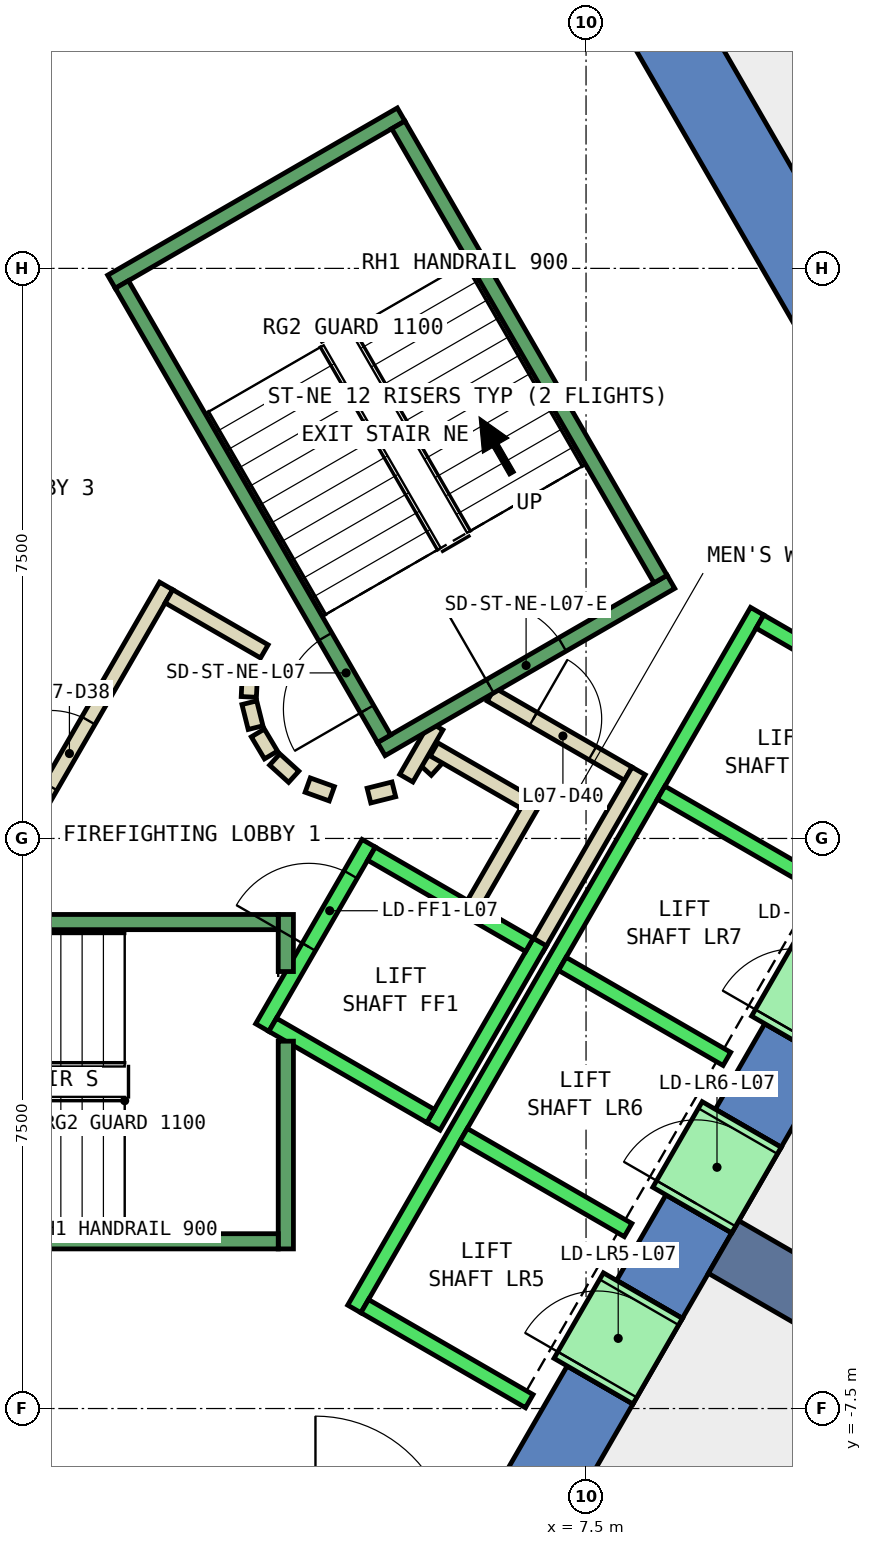
"""IFC4 building model, lengths in metres.
Left out: names, types, materials, properties, quantities, classifications, styles, units other than length and angle.
Written with IfcOpenShell. Run it as: python <this file> out.ifc"""

import sys

from ifc_helpers import new_model, si_unit, direction, frame, frame_2d, origin, place, context, subcontext, project, spatial, polyline, rectangle, outline, extrude, element, fill, save


model = new_model("IFC4")
c1 = context("Model", 3, precision=1e-05, world=origin(), true_north=direction((0.0, 1.0)))
c2 = subcontext(c1, "Body", "Model", "MODEL_VIEW")
j1 = project(units=[si_unit("LENGTHUNIT", "METRE"), si_unit("PLANEANGLEUNIT", "RADIAN")], contexts=[c1])
p1 = place(None, origin())
s1 = spatial("IfcSite", under=j1, at=p1, CompositionType="ELEMENT")
p2 = place(p1, origin())
s2 = spatial("IfcBuilding", under=s1, at=p2, CompositionType="ELEMENT")
p3 = place(p2, frame((0.0, 0.0, 39.2)))
s3 = spatial("IfcBuildingStorey", under=s2, at=p3, CompositionType="ELEMENT", Elevation=39.2)
p4 = place(p3, frame((0.0, 0.0, -0.4)))
e1 = element("IfcWall", 1, at=p4, inside=s3, PredefinedType="SHEAR", context=c2, shape_type="SweptSolid", body=[
    extrude(outline(polyline([(8.517, 11.748), (7.651, 11.248), (12.702, 2.5), (13.856, 2.5), (8.517, 11.748)])), origin(), (0.0, 0.0, 1.0), 4.2),
])
p5 = place(p3, frame((0.0, 0.0, -0.4)))
e2 = element("IfcWall", 2, at=p5, inside=s3, PredefinedType="SHEAR", context=c2, shape_type="SweptSolid", body=[
    extrude(outline(polyline([(8.117, -7.44), (7.252, -6.94), (6.351, -8.5), (6.928, -9.5), (8.117, -7.44)])), origin(), (0.0, 0.0, 1.0), 4.2),
])
p6 = place(p3, frame((0.0, 0.0, -0.4)))
e3 = element("IfcWall", 3, at=p6, inside=s3, PredefinedType="SHEAR", context=c2, shape_type="SweptSolid", body=[
    extrude(outline(polyline([(9.417, -5.189), (8.551, -4.689), (7.902, -5.814), (8.767, -6.314), (9.417, -5.189)])), origin(), (0.0, 0.0, 1.0), 4.2),
])
p7 = place(p3, frame((0.0, 0.0, -0.4)))
e4 = element("IfcWall", 4, at=p7, inside=s3, PredefinedType="SHEAR", context=c2, shape_type="SweptSolid", body=[
    extrude(outline(polyline([(10.717, -2.937), (9.851, -2.437), (9.201, -3.563), (10.067, -4.063), (10.717, -2.937)])), origin(), (0.0, 0.0, 1.0), 4.2),
])
p8 = place(p3, frame((0.0, 0.0, 3.6)))
e5 = element("IfcWall", 5, at=p8, inside=s3, PredefinedType="SHEAR", context=c2, shape_type="SweptSolid", body=[
    extrude(outline(polyline([(8.767, -6.314), (7.902, -5.814), (7.252, -6.94), (8.117, -7.44), (8.767, -6.314)])), origin(), (0.0, 0.0, 1.0), 0.2),
])
p9 = place(p3, frame((0.0, 0.0, 3.6)))
e6 = element("IfcWall", 6, at=p9, inside=s3, PredefinedType="SHEAR", context=c2, shape_type="SweptSolid", body=[
    extrude(outline(polyline([(10.067, -4.063), (9.201, -3.563), (8.551, -4.689), (9.417, -5.189), (10.067, -4.063)])), origin(), (0.0, 0.0, 1.0), 0.2),
])
p10 = place(p3, frame((0.0, 0.0, 3.6)))
e7 = element("IfcWall", 7, at=p10, inside=s3, PredefinedType="SHEAR", context=c2, shape_type="SweptSolid", body=[
    extrude(outline(polyline([(11.367, -1.811), (10.501, -1.311), (9.851, -2.437), (10.717, -2.937), (11.367, -1.811)])), origin(), (0.0, 0.0, 1.0), 0.2),
])
p11 = place(p3, frame((9.31, -5.375, -0.4), z_axis=(0.0, 0.0, 1.0), x_axis=(0.866017533419, -0.500013631625, 0.0)))
e8 = element("IfcWall", 8, at=p11, inside=s3, PredefinedType="SHEAR", context=c2, shape_type="SweptSolid", body=[
    extrude(rectangle(XDim=9.0, YDim=0.8, at=frame_2d((4.5, 0.0))), origin(), (0.0, 0.0, 1.0), 4.2),
])
p12 = place(p3, frame((5.39, 0.898, 0.0), z_axis=(0.0, 0.0, 1.0), x_axis=(0.673828488714, 0.738887791073, 0.0)))
e9 = element("IfcWall", 9, at=p12, inside=s3, PredefinedType="PARTITIONING", context=c2, shape_type="SweptSolid", body=[
    extrude(rectangle(XDim=0.263, YDim=0.2, at=frame_2d((0.131, 0.0))), origin(), (0.0, 0.0, 1.0), 3.8),
])
p13 = place(p3, frame((5.499, 1.172, 0.0), z_axis=(0.0, 0.0, 1.0), x_axis=(0.866333505267, -0.499465972466, 0.0)))
e10 = element("IfcWall", 10, at=p13, inside=s3, PredefinedType="PARTITIONING", context=c2, shape_type="SweptSolid", body=[
    extrude(rectangle(XDim=1.374, YDim=0.2, at=frame_2d((0.687, 0.0))), origin(), (0.0, 0.0, 1.0), 3.8),
])
p14 = place(p3, frame((6.826, 0.522, 0.0), z_axis=(0.0, 0.0, 1.0), x_axis=(-0.500016722714, -0.866015748706, 0.0)))
e11 = element("IfcWall", 11, at=p14, inside=s3, PredefinedType="PARTITIONING", context=c2, shape_type="SweptSolid", body=[
    extrude(rectangle(XDim=1.7, YDim=0.2, at=frame_2d((0.85, 0.0))), origin(), (0.0, 0.0, 1.0), 3.8),
])
p15 = place(p3, frame((6.25, 1.894, 0.0), z_axis=(0.0, 0.0, 1.0), x_axis=(0.866043184279, -0.499969202016, 0.0)))
e12 = element("IfcWall", 12, at=p15, inside=s3, PredefinedType="PARTITIONING", context=c2, shape_type="SweptSolid", body=[
    extrude(rectangle(XDim=2.084, YDim=0.2, at=frame_2d((1.042, 0.0))), origin(), (0.0, 0.0, 1.0), 3.8),
])
p16 = place(p15, frame((0.642, 0.0, 0.0)))
e13 = element("IfcOpeningElement", 13, at=p16, cuts=e12, PredefinedType="OPENING", context=c2, shape_type="SweptSolid", body=[
    extrude(rectangle(XDim=0.9, YDim=2.1, at=frame_2d((0.45, 1.05))), frame((0.0, 0.11, 0.0), z_axis=(0.0, -1.0, 0.0), x_axis=(1.0, 0.0, 0.0)), (0.0, 0.0, 1.0), 0.22),
])
p17 = place(p3, frame((8.192, 0.888, 0.0), z_axis=(0.0, 0.0, 1.0), x_axis=(-0.499940625693, -0.866059680843, 0.0)))
e14 = element("IfcWall", 14, at=p17, inside=s3, PredefinedType="PARTITIONING", context=c2, shape_type="SweptSolid", body=[
    extrude(rectangle(XDim=2.68, YDim=0.2, at=frame_2d((1.34, 0.0))), origin(), (0.0, 0.0, 1.0), 3.8),
])
p18 = place(p3, frame((5.135, 0.793, 0.0), z_axis=(0.0, 0.0, 1.0), x_axis=(0.499526442893, 0.866298639529, 0.0)))
e15 = element("IfcWall", 15, at=p18, inside=s3, PredefinedType="PARTITIONING", context=c2, shape_type="SweptSolid", body=[
    extrude(rectangle(XDim=0.791, YDim=0.2, at=frame_2d((0.396, 0.0))), origin(), (0.0, 0.0, 1.0), 3.8),
])
p19 = place(p3, frame((-0.52, -1.0, 0.0), z_axis=(0.0, 0.0, 1.0), x_axis=(0.50011622646, 0.865958290007, 0.0)))
e16 = element("IfcWall", 16, at=p19, inside=s3, PredefinedType="PARTITIONING", context=c2, shape_type="SweptSolid", body=[
    extrude(rectangle(XDim=4.991, YDim=0.2, at=frame_2d((2.496, 0.0))), origin(), (0.0, 0.0, 1.0), 3.8),
])
p20 = place(p19, frame((1.945, 0.0, 0.0)))
e17 = element("IfcOpeningElement", 17, at=p20, cuts=e16, PredefinedType="OPENING", context=c2, shape_type="SweptSolid", body=[
    extrude(rectangle(XDim=1.0, YDim=2.1, at=frame_2d((0.5, 1.05))), frame((0.0, 0.11, 0.0), z_axis=(0.0, -1.0, 0.0), x_axis=(1.0, 0.0, 0.0)), (0.0, 0.0, 1.0), 0.22),
])
p21 = place(p3, frame((2.012, 3.186, 0.0), z_axis=(0.0, 0.0, 1.0), x_axis=(0.865891012941, -0.500232699559, 0.0)))
e18 = element("IfcWall", 18, at=p21, inside=s3, PredefinedType="PARTITIONING", context=c2, shape_type="SweptSolid", body=[
    extrude(rectangle(XDim=1.449, YDim=0.2, at=frame_2d((0.725, 0.0))), origin(), (0.0, 0.0, 1.0), 3.8),
])
p22 = place(p3, frame((3.079, 2.199, 0.0), z_axis=(0.0, 0.0, 1.0), x_axis=(-0.047771483479, -0.998858290933, 0.0)))
e19 = element("IfcWall", 19, at=p22, inside=s3, PredefinedType="PARTITIONING", context=c2, shape_type="SweptSolid", body=[
    extrude(rectangle(XDim=0.337, YDim=0.2, at=frame_2d((0.169, 0.0))), origin(), (0.0, 0.0, 1.0), 3.8),
])
p23 = place(p3, frame((3.07, 1.786, 0.0), z_axis=(0.0, 0.0, 1.0), x_axis=(0.242705583207, -0.970099994784, 0.0)))
e20 = element("IfcWall", 20, at=p23, inside=s3, PredefinedType="PARTITIONING", context=c2, shape_type="SweptSolid", body=[
    extrude(rectangle(XDim=0.338, YDim=0.2, at=frame_2d((0.169, 0.0))), origin(), (0.0, 0.0, 1.0), 3.8),
])
for number, where, z_axis, x_axis in (
    (21, (3.182, 1.388, 0.0), (0.0, 0.0, 1.0), (0.512, -0.859, 0.0)),
    (22, (3.404, 1.039, 0.0), (0.0, 0.0, 1.0), (0.74, -0.672, 0.0)),
):
    element("IfcWall", number, at=place(p3, frame(where, z_axis=z_axis, x_axis=x_axis)), inside=s3, PredefinedType="PARTITIONING", context=c2, shape_type="SweptSolid", body=[
        extrude(rectangle(XDim=0.338, YDim=0.2, at=frame_2d((0.169, 0.0))), origin(), (0.0, 0.0, 1.0), 3.8),
    ])
p24 = place(p3, frame((3.838, 0.702, 0.0), z_axis=(0.0, 0.0, 1.0), x_axis=(0.941035081519, -0.338308993895, 0.0)))
e23 = element("IfcWall", 23, at=p24, inside=s3, PredefinedType="PARTITIONING", context=c2, shape_type="SweptSolid", body=[
    extrude(rectangle(XDim=0.337, YDim=0.2, at=frame_2d((0.168, 0.0))), origin(), (0.0, 0.0, 1.0), 3.8),
])
p25 = place(p3, frame((4.644, 0.564, 0.0), z_axis=(0.0, 0.0, 1.0), x_axis=(0.969929076366, 0.243387729394, 0.0)))
e24 = element("IfcWall", 24, at=p25, inside=s3, PredefinedType="PARTITIONING", context=c2, shape_type="SweptSolid", body=[
    extrude(rectangle(XDim=0.337, YDim=0.2, at=frame_2d((0.168, 0.0))), origin(), (0.0, 0.0, 1.0), 3.8),
])
p26 = place(p3, frame((12.401, -7.621, 0.0), z_axis=(0.0, 0.0, 1.0), x_axis=(-0.499983724212, -0.866034800411, 0.0)))
e25 = element("IfcWall", 25, at=p26, inside=s3, PredefinedType="PARTITIONING", context=c2, shape_type="SweptSolid", body=[
    extrude(rectangle(XDim=9.302, YDim=0.2, at=frame_2d((4.651, 0.0))), origin(), (0.0, 0.0, 1.0), 3.8),
])
p27 = place(p26, frame((1.429, 0.0, 0.0)))
e26 = element("IfcOpeningElement", 26, at=p27, cuts=e25, PredefinedType="OPENING", context=c2, shape_type="SweptSolid", body=[
    extrude(rectangle(XDim=1.0, YDim=2.1, at=frame_2d((0.5, 1.05))), frame((0.0, 0.11, 0.0), z_axis=(0.0, -1.0, 0.0), x_axis=(1.0, 0.0, 0.0)), (0.0, 0.0, 1.0), 0.22),
])
p28 = place(p26, frame((2.529, 0.0, 0.0)))
e27 = element("IfcOpeningElement", 27, at=p28, cuts=e25, PredefinedType="OPENING", context=c2, shape_type="SweptSolid", body=[
    extrude(rectangle(XDim=1.0, YDim=2.1, at=frame_2d((0.5, 1.05))), frame((0.0, 0.11, 0.0), z_axis=(0.0, -1.0, 0.0), x_axis=(1.0, 0.0, 0.0)), (0.0, 0.0, 1.0), 0.22),
])
p29 = place(p3, frame((3.24, -2.488, 0.0), z_axis=(0.0, 0.0, 1.0), x_axis=(0.49994636267, 0.866056369097, 0.0)))
e28 = element("IfcWall", 28, at=p29, inside=s3, PredefinedType="STANDARD", context=c2, shape_type="SweptSolid", body=[
    extrude(rectangle(XDim=2.8, YDim=0.2, at=frame_2d((1.4, 0.0))), origin(), (0.0, 0.0, 1.0), 3.8),
])
p30 = place(p29, frame((1.225, 0.0, 0.0)))
e29 = element("IfcOpeningElement", 29, at=p30, cuts=e28, PredefinedType="OPENING", context=c2, shape_type="SweptSolid", body=[
    extrude(rectangle(XDim=1.1, YDim=2.1, at=frame_2d((0.55, 1.05))), frame((0.0, 0.11, 0.0), z_axis=(0.0, -1.0, 0.0), x_axis=(1.0, 0.0, 0.0)), (0.0, 0.0, 1.0), 0.22),
])
p31 = place(p3, frame((5.492, -3.788, 0.0), z_axis=(0.0, 0.0, 1.0), x_axis=(0.500011755427, 0.866018616679, 0.0)))
e30 = element("IfcWall", 30, at=p31, inside=s3, PredefinedType="STANDARD", context=c2, shape_type="SweptSolid", body=[
    extrude(rectangle(XDim=2.8, YDim=0.2, at=frame_2d((1.4, 0.0))), origin(), (0.0, 0.0, 1.0), 3.8),
])
p32 = place(p3, frame((3.377, -2.452, 0.0), z_axis=(0.0, 0.0, 1.0), x_axis=(0.865955154139, -0.50012165622, 0.0)))
e31 = element("IfcWall", 31, at=p32, inside=s3, PredefinedType="STANDARD", context=c2, shape_type="SweptSolid", body=[
    extrude(rectangle(XDim=2.4, YDim=0.2, at=frame_2d((1.2, 0.0))), origin(), (0.0, 0.0, 1.0), 3.8),
])
p33 = place(p3, frame((4.677, -0.2, 0.0), z_axis=(0.0, 0.0, 1.0), x_axis=(0.865973769406, -0.500089422704, 0.0)))
e32 = element("IfcWall", 32, at=p33, inside=s3, PredefinedType="STANDARD", context=c2, shape_type="SweptSolid", body=[
    extrude(rectangle(XDim=2.399, YDim=0.2, at=frame_2d((1.2, 0.0))), origin(), (0.0, 0.0, 1.0), 3.8),
])
p34 = place(p3, frame((4.451, -6.19, 0.0), z_axis=(0.0, 0.0, 1.0), x_axis=(0.50000090737, 0.866024879913, 0.0)))
e33 = element("IfcWall", 33, at=p34, inside=s3, PredefinedType="STANDARD", context=c2, shape_type="SweptSolid", body=[
    extrude(rectangle(XDim=10.6, YDim=0.2, at=frame_2d((5.3, 0.0))), origin(), (0.0, 0.0, 1.0), 3.8),
])
for number, where, z_axis, x_axis in (
    (34, (4.588, -6.153, 0.0), (0.0, 0.0, 1.0), (0.866, -0.5, 0.0)),
    (35, (5.888, -3.902, 0.0), (0.0, 0.0, 1.0), (0.866, -0.5, 0.0)),
    (36, (7.188, -1.65, 0.0), (0.0, 0.0, 1.0), (0.866, -0.5, 0.0)),
    (37, (8.488, 0.602, 0.0), (0.0, 0.0, 1.0), (0.866, -0.5, 0.0)),
):
    element("IfcWall", number, at=place(p3, frame(where, z_axis=z_axis, x_axis=x_axis)), inside=s3, PredefinedType="STANDARD", context=c2, shape_type="SweptSolid", body=[
        extrude(rectangle(XDim=2.5, YDim=0.2, at=frame_2d((1.25, 0.0))), origin(), (0.0, 0.0, 1.0), 3.8),
    ])
p35 = place(p3, frame((9.788, 2.853, 0.0), z_axis=(0.0, 0.0, 1.0), x_axis=(0.865998541277, -0.500046524342, 0.0)))
e38 = element("IfcWall", 38, at=p35, inside=s3, PredefinedType="STANDARD", context=c2, shape_type="SweptSolid", body=[
    extrude(rectangle(XDim=2.5, YDim=0.2, at=frame_2d((1.25, 0.0))), origin(), (0.0, 0.0, 1.0), 3.8),
])
p36 = place(p3, frame((7.598, -7.14, 0.0), z_axis=(0.0, 0.0, 1.0), x_axis=(0.500362116554, 0.865816234728, 0.0)))
e39 = element("IfcWall", 39, at=p36, inside=s3, PredefinedType="STANDARD", context=c2, shape_type="SweptSolid", body=[
    extrude(rectangle(XDim=1.299, YDim=1.2, at=frame_2d((0.65, 0.0))), origin(), (0.0, 0.0, 1.0), 2.4),
])
p37 = place(p36, frame((0.1, 0.0, 0.0)))
e40 = element("IfcOpeningElement", 40, at=p37, cuts=e39, PredefinedType="OPENING", context=c2, shape_type="SweptSolid", body=[
    extrude(rectangle(XDim=1.1, YDim=2.3, at=frame_2d((0.55, 1.15))), frame((0.0, 0.61, 0.0), z_axis=(0.0, -1.0, 0.0), x_axis=(1.0, 0.0, 0.0)), (0.0, 0.0, 1.0), 1.22),
])
p38 = place(p3, frame((8.898, -4.889, 0.0), z_axis=(0.0, 0.0, 1.0), x_axis=(0.500036693733, 0.866004217611, 0.0)))
e41 = element("IfcWall", 41, at=p38, inside=s3, PredefinedType="STANDARD", context=c2, shape_type="SweptSolid", body=[
    extrude(rectangle(XDim=1.3, YDim=1.2, at=frame_2d((0.65, 0.0))), origin(), (0.0, 0.0, 1.0), 2.4),
])
p39 = place(p38, frame((0.1, 0.0, 0.0)))
e42 = element("IfcOpeningElement", 42, at=p39, cuts=e41, PredefinedType="OPENING", context=c2, shape_type="SweptSolid", body=[
    extrude(rectangle(XDim=1.1, YDim=2.3, at=frame_2d((0.55, 1.15))), frame((0.0, 0.61, 0.0), z_axis=(0.0, -1.0, 0.0), x_axis=(1.0, 0.0, 0.0)), (0.0, 0.0, 1.0), 1.22),
])
p40 = place(p3, frame((10.198, -2.637, 0.0), z_axis=(0.0, 0.0, 1.0), x_axis=(0.49989585183, 0.866085525409, 0.0)))
e43 = element("IfcWall", 43, at=p40, inside=s3, PredefinedType="STANDARD", context=c2, shape_type="SweptSolid", body=[
    extrude(rectangle(XDim=1.3, YDim=1.2, at=frame_2d((0.65, 0.0))), origin(), (0.0, 0.0, 1.0), 2.4),
])
p41 = place(p40, frame((0.1, 0.0, 0.0)))
e44 = element("IfcOpeningElement", 44, at=p41, cuts=e43, PredefinedType="OPENING", context=c2, shape_type="SweptSolid", body=[
    extrude(rectangle(XDim=1.1, YDim=2.3, at=frame_2d((0.55, 1.15))), frame((0.0, 0.61, 0.0), z_axis=(0.0, -1.0, 0.0), x_axis=(1.0, 0.0, 0.0)), (0.0, 0.0, 1.0), 1.22),
])
p42 = place(p3, frame((3.55, -2.667, 0.0), z_axis=(0.0, 0.0, 1.0), x_axis=(0.0, -1.0, 0.0)))
e45 = element("IfcWall", 45, at=p42, inside=s3, PredefinedType="STANDARD", context=c2, shape_type="SweptSolid", body=[
    extrude(rectangle(XDim=2.733, YDim=0.2, at=frame_2d((1.366, 0.0))), origin(), (0.0, 0.0, 1.0), 3.8),
])
p43 = place(p3, frame((3.55, -1.0, 0.0), z_axis=(0.0, 0.0, 1.0), x_axis=(0.0, -1.0, 0.0)))
e46 = element("IfcWall", 46, at=p43, inside=s3, PredefinedType="STANDARD", context=c2, shape_type="SweptSolid", body=[
    extrude(rectangle(XDim=0.751, YDim=0.2, at=frame_2d((0.375, 0.0))), origin(), (0.0, 0.0, 1.0), 3.8),
])
p44 = place(p3, frame((-3.45, -1.1, 0.0), z_axis=(0.0, 0.0, 1.0), x_axis=(1.0, 0.0, 0.0)))
e47 = element("IfcWall", 47, at=p44, inside=s3, PredefinedType="STANDARD", context=c2, shape_type="SweptSolid", body=[
    extrude(rectangle(XDim=6.9, YDim=0.2, at=frame_2d((3.45, 0.0))), origin(), (0.0, 0.0, 1.0), 3.8),
])
p45 = place(p44, frame((0.45, 0.0, 0.0)))
e48 = element("IfcOpeningElement", 48, at=p45, cuts=e47, PredefinedType="OPENING", context=c2, shape_type="SweptSolid", body=[
    extrude(rectangle(XDim=1.1, YDim=2.2, at=frame_2d((0.55, 1.1))), frame((0.0, 0.11, 0.0), z_axis=(0.0, -1.0, 0.0), x_axis=(1.0, 0.0, 0.0)), (0.0, 0.0, 1.0), 0.22),
])
p46 = place(p3, frame((-3.45, -5.3, 0.0), z_axis=(0.0, 0.0, 1.0), x_axis=(1.0, 0.0, 0.0)))
e49 = element("IfcWall", 49, at=p46, inside=s3, PredefinedType="STANDARD", context=c2, shape_type="SweptSolid", body=[
    extrude(rectangle(XDim=6.9, YDim=0.2, at=frame_2d((3.45, 0.0))), origin(), (0.0, 0.0, 1.0), 3.8),
])
p47 = place(p3, frame((4.806, 1.176, 0.0), z_axis=(0.0, 0.0, 1.0), x_axis=(0.866059941101, 0.499940174841, 0.0)))
e50 = element("IfcWall", 50, at=p47, inside=s3, PredefinedType="STANDARD", context=c2, shape_type="SweptSolid", body=[
    extrude(rectangle(XDim=4.4, YDim=0.2, at=frame_2d((2.2, 0.0))), origin(), (0.0, 0.0, 1.0), 3.8),
])
p48 = place(p47, frame((1.65, 0.0, 0.0)))
e51 = element("IfcOpeningElement", 51, at=p48, cuts=e50, PredefinedType="OPENING", context=c2, shape_type="SweptSolid", body=[
    extrude(rectangle(XDim=1.1, YDim=2.2, at=frame_2d((0.55, 1.1))), frame((0.0, 0.11, 0.0), z_axis=(0.0, -1.0, 0.0), x_axis=(1.0, 0.0, 0.0)), (0.0, 0.0, 1.0), 0.22),
])
p49 = place(p3, frame((1.256, 7.324, 0.0), z_axis=(0.0, 0.0, 1.0), x_axis=(0.866046073146, 0.499964197906, 0.0)))
e52 = element("IfcWall", 52, at=p49, inside=s3, PredefinedType="STANDARD", context=c2, shape_type="SweptSolid", body=[
    extrude(rectangle(XDim=4.4, YDim=0.2, at=frame_2d((2.2, 0.0))), origin(), (0.0, 0.0, 1.0), 3.8),
])
p50 = place(p3, frame((4.843, 1.312, 0.0), z_axis=(0.0, 0.0, 1.0), x_axis=(-0.499963383562, 0.866046543262, 0.0)))
e53 = element("IfcWall", 53, at=p50, inside=s3, PredefinedType="STANDARD", context=c2, shape_type="SweptSolid", body=[
    extrude(rectangle(XDim=6.9, YDim=0.2, at=frame_2d((3.45, 0.0))), origin(), (0.0, 0.0, 1.0), 3.8),
])
p51 = place(p50, frame((0.45, 0.0, 0.0)))
e54 = element("IfcOpeningElement", 54, at=p51, cuts=e53, PredefinedType="OPENING", context=c2, shape_type="SweptSolid", body=[
    extrude(rectangle(XDim=1.1, YDim=2.2, at=frame_2d((0.55, 1.1))), frame((0.0, 0.11, 0.0), z_axis=(0.0, -1.0, 0.0), x_axis=(1.0, 0.0, 0.0)), (0.0, 0.0, 1.0), 0.22),
])
p52 = place(p3, frame((8.48, 3.412, 0.0), z_axis=(0.0, 0.0, 1.0), x_axis=(-0.499978703459, 0.866037698999, 0.0)))
e55 = element("IfcWall", 55, at=p52, inside=s3, PredefinedType="STANDARD", context=c2, shape_type="SweptSolid", body=[
    extrude(rectangle(XDim=6.9, YDim=0.2, at=frame_2d((3.45, 0.0))), origin(), (0.0, 0.0, 1.0), 3.8),
])
p53 = place(p20, origin())
e56 = element("IfcDoor", 56, at=p53, inside=s3, OperationType="SINGLE_SWING_LEFT", PredefinedType="DOOR", context=c2, shape_type="SweptSolid", body=[
    extrude(rectangle(XDim=1.0, YDim=2.1, at=frame_2d((0.5, 1.05))), frame((0.0, 0.025, 0.0), z_axis=(0.0, -1.0, 0.0), x_axis=(1.0, 0.0, 0.0)), (0.0, 0.0, 1.0), 0.05),
])
fill(e17, e56)
p54 = place(p16, origin())
e57 = element("IfcDoor", 57, at=p54, inside=s3, OperationType="SINGLE_SWING_LEFT", PredefinedType="DOOR", context=c2, shape_type="SweptSolid", body=[
    extrude(rectangle(XDim=0.9, YDim=2.1, at=frame_2d((0.45, 1.05))), frame((0.0, 0.025, 0.0), z_axis=(0.0, -1.0, 0.0), x_axis=(1.0, 0.0, 0.0)), (0.0, 0.0, 1.0), 0.05),
])
fill(e13, e57)
p55 = place(p37, origin())
e58 = element("IfcDoor", 58, at=p55, inside=s3, OperationType="SLIDING_TO_LEFT", PredefinedType="DOOR", context=c2, shape_type="SweptSolid", body=[
    extrude(rectangle(XDim=1.1, YDim=2.3, at=frame_2d((0.55, 1.15))), frame((0.0, 0.025, 0.0), z_axis=(0.0, -1.0, 0.0), x_axis=(1.0, 0.0, 0.0)), (0.0, 0.0, 1.0), 0.05),
])
fill(e40, e58)
p56 = place(p39, origin())
e59 = element("IfcDoor", 59, at=p56, inside=s3, OperationType="SLIDING_TO_LEFT", PredefinedType="DOOR", context=c2, shape_type="SweptSolid", body=[
    extrude(rectangle(XDim=1.1, YDim=2.3, at=frame_2d((0.55, 1.15))), frame((0.0, 0.025, 0.0), z_axis=(0.0, -1.0, 0.0), x_axis=(1.0, 0.0, 0.0)), (0.0, 0.0, 1.0), 0.05),
])
fill(e42, e59)
p57 = place(p30, origin())
e60 = element("IfcDoor", 60, at=p57, inside=s3, OperationType="SLIDING_TO_LEFT", PredefinedType="DOOR", context=c2, shape_type="SweptSolid", body=[
    extrude(rectangle(XDim=1.1, YDim=2.1, at=frame_2d((0.55, 1.05))), frame((0.0, 0.025, 0.0), z_axis=(0.0, -1.0, 0.0), x_axis=(1.0, 0.0, 0.0)), (0.0, 0.0, 1.0), 0.05),
])
fill(e29, e60)
p58 = place(p51, origin())
e61 = element("IfcDoor", 61, at=p58, inside=s3, OperationType="SINGLE_SWING_LEFT", PredefinedType="DOOR", context=c2, shape_type="SweptSolid", body=[
    extrude(rectangle(XDim=1.1, YDim=2.2, at=frame_2d((0.55, 1.1))), frame((0.0, 0.025, 0.0), z_axis=(0.0, -1.0, 0.0), x_axis=(1.0, 0.0, 0.0)), (0.0, 0.0, 1.0), 0.05),
])
fill(e54, e61)
p59 = place(p48, origin())
e62 = element("IfcDoor", 62, at=p59, inside=s3, OperationType="SINGLE_SWING_LEFT", PredefinedType="DOOR", context=c2, shape_type="SweptSolid", body=[
    extrude(rectangle(XDim=1.1, YDim=2.2, at=frame_2d((0.55, 1.1))), frame((0.0, 0.025, 0.0), z_axis=(0.0, -1.0, 0.0), x_axis=(1.0, 0.0, 0.0)), (0.0, 0.0, 1.0), 0.05),
])
fill(e51, e62)
save(model, sys.argv[1])
